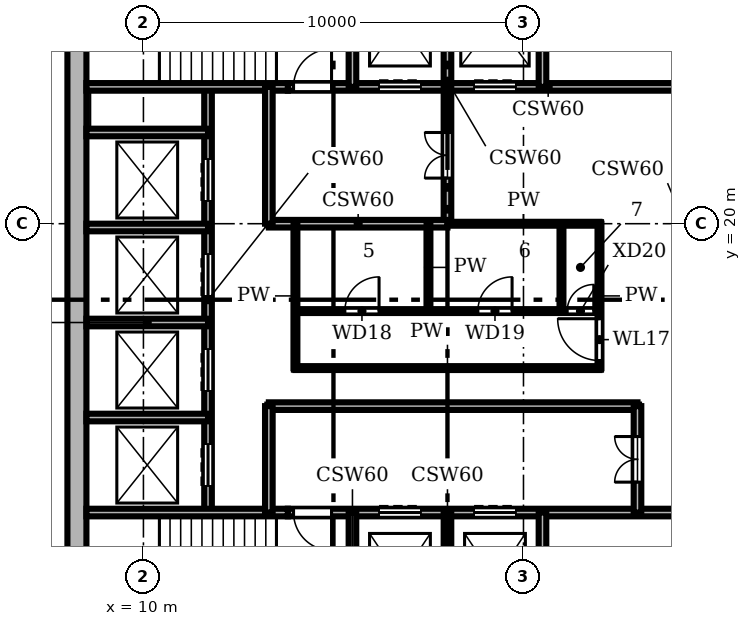
"""IFC4 building model, lengths in metres.
Left out: names, types, materials, properties, quantities, classifications, styles, units other than length and angle.
Written with IfcOpenShell. Run it as: python <this file> out.ifc"""

import sys

from ifc_helpers import new_model, si_unit, direction, frame, frame_2d, origin, place, context, subcontext, project, spatial, rectangle, extrude, element, fill, save


model = new_model("IFC4")
c1 = context("Model", 3, precision=1e-05, world=origin(), true_north=direction((0.0, 1.0)))
c2 = subcontext(c1, "Body", "Model", "MODEL_VIEW")
j1 = project(units=[si_unit("LENGTHUNIT", "METRE"), si_unit("PLANEANGLEUNIT", "RADIAN")], contexts=[c1])
p1 = place(None, origin())
s1 = spatial("IfcSite", under=j1, at=p1, CompositionType="ELEMENT")
p2 = place(p1, origin())
s2 = spatial("IfcBuilding", under=s1, at=p2, CompositionType="ELEMENT")
p3 = place(p2, frame((0.0, 0.0, 251.4)))
s3 = spatial("IfcBuildingStorey", under=s2, at=p3, CompositionType="ELEMENT", Elevation=251.4)
p4 = place(p3, frame((8.25, 27.5, 0.0), z_axis=(0.0, 0.0, 1.0), x_axis=(0.0, -1.0, 0.0)))
e1 = element("IfcWall", 1, at=p4, inside=s3, PredefinedType="SHEAR", context=c2, shape_type="SweptSolid", body=[
    extrude(rectangle(XDim=19.0, YDim=0.5, at=frame_2d((9.5, 0.0))), origin(), (0.0, 0.0, 1.0), 3.9),
])
p5 = place(p3, frame((8.5, 12.4, 0.0), z_axis=(0.0, 0.0, 1.0), x_axis=(1.0, 0.0, 0.0)))
e2 = element("IfcWall", 2, at=p5, inside=s3, PredefinedType="SHEAR", context=c2, shape_type="SweptSolid", body=[
    extrude(rectangle(XDim=5.3, YDim=0.2, at=frame_2d((2.65, 0.0))), origin(), (0.0, 0.0, 1.0), 3.58),
])
p6 = place(p3, frame((13.8, 12.4, 0.0), z_axis=(0.0, 0.0, 1.0), x_axis=(1.0, 0.0, 0.0)))
e3 = element("IfcWall", 3, at=p6, inside=s3, PredefinedType="SHEAR", context=c2, shape_type="SweptSolid", body=[
    extrude(rectangle(XDim=13.7, YDim=0.2, at=frame_2d((6.85, 0.0))), origin(), (0.0, 0.0, 1.0), 3.58),
])
p7 = place(p6, frame((2.4, 0.0, 0.0)))
e4 = element("IfcOpeningElement", 4, at=p7, cuts=e3, PredefinedType="OPENING", context=c2, shape_type="SweptSolid", body=[
    extrude(rectangle(XDim=1.1, YDim=2.1, at=frame_2d((0.55, 1.05))), frame((0.0, 0.11, 0.0), z_axis=(0.0, -1.0, 0.0), x_axis=(1.0, 0.0, 0.0)), (0.0, 0.0, 1.0), 0.22),
])
p8 = place(p6, frame((4.9, 0.0, 0.0)))
e5 = element("IfcOpeningElement", 5, at=p8, cuts=e3, PredefinedType="OPENING", context=c2, shape_type="SweptSolid", body=[
    extrude(rectangle(XDim=1.1, YDim=2.1, at=frame_2d((0.55, 1.05))), frame((0.0, 0.11, 0.0), z_axis=(0.0, -1.0, 0.0), x_axis=(1.0, 0.0, 0.0)), (0.0, 0.0, 1.0), 0.22),
])
p9 = place(p6, frame((0.15, 0.0, 0.0)))
e6 = element("IfcOpeningElement", 6, at=p9, cuts=e3, PredefinedType="OPENING", context=c2, shape_type="SweptSolid", body=[
    extrude(rectangle(XDim=1.0, YDim=2.1, at=frame_2d((0.5, 1.05))), frame((0.0, 0.11, 0.0), z_axis=(0.0, -1.0, 0.0), x_axis=(1.0, 0.0, 0.0)), (0.0, 0.0, 1.0), 0.22),
])
p10 = place(p3, frame((8.5, 14.9, 0.0), z_axis=(0.0, 0.0, 1.0), x_axis=(1.0, 0.0, 0.0)))
e7 = element("IfcWall", 7, at=p10, inside=s3, PredefinedType="SHEAR", context=c2, shape_type="SweptSolid", body=[
    extrude(rectangle(XDim=3.2, YDim=0.2, at=frame_2d((1.6, 0.0))), origin(), (0.0, 0.0, 1.0), 3.58),
])
p11 = place(p3, frame((13.3, 15.2, 0.0), z_axis=(0.0, 0.0, 1.0), x_axis=(1.0, 0.0, 0.0)))
e8 = element("IfcWall", 8, at=p11, inside=s3, PredefinedType="SHEAR", context=c2, shape_type="SweptSolid", body=[
    extrude(rectangle(XDim=9.7, YDim=0.2, at=frame_2d((4.85, 0.0))), origin(), (0.0, 0.0, 1.0), 3.58),
])
p12 = place(p3, frame((14.0, 16.2, 0.0), z_axis=(0.0, 0.0, 1.0), x_axis=(1.0, 0.0, 0.0)))
e9 = element("IfcWall", 9, at=p12, inside=s3, PredefinedType="PARTITIONING", context=c2, shape_type="SweptSolid", body=[
    extrude(rectangle(XDim=8.0, YDim=0.1, at=frame_2d((4.0, 0.0))), origin(), (0.0, 0.0, 1.0), 3.58),
])
p13 = place(p3, frame((8.5, 17.4, 0.0), z_axis=(0.0, 0.0, 1.0), x_axis=(1.0, 0.0, 0.0)))
e10 = element("IfcWall", 10, at=p13, inside=s3, PredefinedType="SHEAR", context=c2, shape_type="SweptSolid", body=[
    extrude(rectangle(XDim=3.2, YDim=0.2, at=frame_2d((1.6, 0.0))), origin(), (0.0, 0.0, 1.0), 3.58),
])
p14 = place(p3, frame((14.0, 17.7, 0.0), z_axis=(0.0, 0.0, 1.0), x_axis=(1.0, 0.0, 0.0)))
e11 = element("IfcWall", 11, at=p14, inside=s3, PredefinedType="PARTITIONING", context=c2, shape_type="SweptSolid", body=[
    extrude(rectangle(XDim=8.0, YDim=0.1, at=frame_2d((4.0, 0.0))), origin(), (0.0, 0.0, 1.0), 3.58),
])
p15 = place(p14, frame((1.3, 0.0, 0.0)))
e12 = element("IfcOpeningElement", 12, at=p15, cuts=e11, PredefinedType="OPENING", context=c2, shape_type="SweptSolid", body=[
    extrude(rectangle(XDim=0.9, YDim=2.1, at=frame_2d((0.45, 1.05))), frame((0.0, 0.06, 0.0), z_axis=(0.0, -1.0, 0.0), x_axis=(1.0, 0.0, 0.0)), (0.0, 0.0, 1.0), 0.12),
])
p16 = place(p14, frame((4.8, 0.0, 0.0)))
e13 = element("IfcOpeningElement", 13, at=p16, cuts=e11, PredefinedType="OPENING", context=c2, shape_type="SweptSolid", body=[
    extrude(rectangle(XDim=0.9, YDim=2.1, at=frame_2d((0.45, 1.05))), frame((0.0, 0.06, 0.0), z_axis=(0.0, -1.0, 0.0), x_axis=(1.0, 0.0, 0.0)), (0.0, 0.0, 1.0), 0.12),
])
p17 = place(p14, frame((7.15, 0.0, 0.0)))
e14 = element("IfcOpeningElement", 14, at=p17, cuts=e11, PredefinedType="OPENING", context=c2, shape_type="SweptSolid", body=[
    extrude(rectangle(XDim=0.7, YDim=2.1, at=frame_2d((0.35, 1.05))), frame((0.0, 0.06, 0.0), z_axis=(0.0, -1.0, 0.0), x_axis=(1.0, 0.0, 0.0)), (0.0, 0.0, 1.0), 0.12),
])
p18 = place(p3, frame((8.5, 19.9, 0.0), z_axis=(0.0, 0.0, 1.0), x_axis=(1.0, 0.0, 0.0)))
e15 = element("IfcWall", 15, at=p18, inside=s3, PredefinedType="SHEAR", context=c2, shape_type="SweptSolid", body=[
    extrude(rectangle(XDim=3.2, YDim=0.2, at=frame_2d((1.6, 0.0))), origin(), (0.0, 0.0, 1.0), 3.58),
])
p19 = place(p3, frame((18.0, 20.0, 0.0), z_axis=(0.0, 0.0, 1.0), x_axis=(1.0, 0.0, 0.0)))
e16 = element("IfcWall", 16, at=p19, inside=s3, PredefinedType="PARTITIONING", context=c2, shape_type="SweptSolid", body=[
    extrude(rectangle(XDim=4.0, YDim=0.1, at=frame_2d((2.0, 0.0))), origin(), (0.0, 0.0, 1.0), 3.58),
])
p20 = place(p3, frame((13.3, 20.0, 0.0), z_axis=(0.0, 0.0, 1.0), x_axis=(1.0, 0.0, 0.0)))
e17 = element("IfcWall", 17, at=p20, inside=s3, PredefinedType="SHEAR", context=c2, shape_type="SweptSolid", body=[
    extrude(rectangle(XDim=4.7, YDim=0.2, at=frame_2d((2.35, 0.0))), origin(), (0.0, 0.0, 1.0), 3.58),
])
p21 = place(p3, frame((8.5, 22.4, 0.0), z_axis=(0.0, 0.0, 1.0), x_axis=(1.0, 0.0, 0.0)))
e18 = element("IfcWall", 18, at=p21, inside=s3, PredefinedType="SHEAR", context=c2, shape_type="SweptSolid", body=[
    extrude(rectangle(XDim=3.2, YDim=0.2, at=frame_2d((1.6, 0.0))), origin(), (0.0, 0.0, 1.0), 3.58),
])
p22 = place(p3, frame((8.5, 23.6, 0.0), z_axis=(0.0, 0.0, 1.0), x_axis=(1.0, 0.0, 0.0)))
e19 = element("IfcWall", 19, at=p22, inside=s3, PredefinedType="SHEAR", context=c2, shape_type="SweptSolid", body=[
    extrude(rectangle(XDim=5.3, YDim=0.2, at=frame_2d((2.65, 0.0))), origin(), (0.0, 0.0, 1.0), 3.58),
])
p23 = place(p3, frame((13.8, 23.6, 0.0), z_axis=(0.0, 0.0, 1.0), x_axis=(1.0, 0.0, 0.0)))
e20 = element("IfcWall", 20, at=p23, inside=s3, PredefinedType="SHEAR", context=c2, shape_type="SweptSolid", body=[
    extrude(rectangle(XDim=13.7, YDim=0.2, at=frame_2d((6.85, 0.0))), origin(), (0.0, 0.0, 1.0), 3.58),
])
p24 = place(p23, frame((2.4, 0.0, 0.0)))
e21 = element("IfcOpeningElement", 21, at=p24, cuts=e20, PredefinedType="OPENING", context=c2, shape_type="SweptSolid", body=[
    extrude(rectangle(XDim=1.1, YDim=2.1, at=frame_2d((0.55, 1.05))), frame((0.0, 0.11, 0.0), z_axis=(0.0, -1.0, 0.0), x_axis=(1.0, 0.0, 0.0)), (0.0, 0.0, 1.0), 0.22),
])
p25 = place(p23, frame((4.9, 0.0, 0.0)))
e22 = element("IfcOpeningElement", 22, at=p25, cuts=e20, PredefinedType="OPENING", context=c2, shape_type="SweptSolid", body=[
    extrude(rectangle(XDim=1.1, YDim=2.1, at=frame_2d((0.55, 1.05))), frame((0.0, 0.11, 0.0), z_axis=(0.0, -1.0, 0.0), x_axis=(1.0, 0.0, 0.0)), (0.0, 0.0, 1.0), 0.22),
])
p26 = place(p23, frame((0.15, 0.0, 0.0)))
e23 = element("IfcOpeningElement", 23, at=p26, cuts=e20, PredefinedType="OPENING", context=c2, shape_type="SweptSolid", body=[
    extrude(rectangle(XDim=1.0, YDim=2.1, at=frame_2d((0.5, 1.05))), frame((0.0, 0.11, 0.0), z_axis=(0.0, -1.0, 0.0), x_axis=(1.0, 0.0, 0.0)), (0.0, 0.0, 1.0), 0.22),
])
p27 = place(p3, frame((11.7, 12.4, 0.0), z_axis=(0.0, 0.0, 1.0), x_axis=(0.0, 1.0, 0.0)))
e24 = element("IfcWall", 24, at=p27, inside=s3, PredefinedType="SHEAR", context=c2, shape_type="SweptSolid", body=[
    extrude(rectangle(XDim=11.2, YDim=0.2, at=frame_2d((5.6, 0.0))), origin(), (0.0, 0.0, 1.0), 3.58),
])
p28 = place(p27, frame((0.7, 0.0, 0.0)))
e25 = element("IfcOpeningElement", 25, at=p28, cuts=e24, PredefinedType="OPENING", context=c2, shape_type="SweptSolid", body=[
    extrude(rectangle(XDim=1.1, YDim=2.1, at=frame_2d((0.55, 1.05))), frame((0.0, 0.11, 0.0), z_axis=(0.0, -1.0, 0.0), x_axis=(1.0, 0.0, 0.0)), (0.0, 0.0, 1.0), 0.22),
])
p29 = place(p27, frame((3.2, 0.0, 0.0)))
e26 = element("IfcOpeningElement", 26, at=p29, cuts=e24, PredefinedType="OPENING", context=c2, shape_type="SweptSolid", body=[
    extrude(rectangle(XDim=1.1, YDim=2.1, at=frame_2d((0.55, 1.05))), frame((0.0, 0.11, 0.0), z_axis=(0.0, -1.0, 0.0), x_axis=(1.0, 0.0, 0.0)), (0.0, 0.0, 1.0), 0.22),
])
p30 = place(p27, frame((5.7, 0.0, 0.0)))
e27 = element("IfcOpeningElement", 27, at=p30, cuts=e24, PredefinedType="OPENING", context=c2, shape_type="SweptSolid", body=[
    extrude(rectangle(XDim=1.1, YDim=2.1, at=frame_2d((0.55, 1.05))), frame((0.0, 0.11, 0.0), z_axis=(0.0, -1.0, 0.0), x_axis=(1.0, 0.0, 0.0)), (0.0, 0.0, 1.0), 0.22),
])
p31 = place(p27, frame((8.2, 0.0, 0.0)))
e28 = element("IfcOpeningElement", 28, at=p31, cuts=e24, PredefinedType="OPENING", context=c2, shape_type="SweptSolid", body=[
    extrude(rectangle(XDim=1.1, YDim=2.1, at=frame_2d((0.55, 1.05))), frame((0.0, 0.11, 0.0), z_axis=(0.0, -1.0, 0.0), x_axis=(1.0, 0.0, 0.0)), (0.0, 0.0, 1.0), 0.22),
])
p32 = place(p3, frame((13.3, 12.4, 0.0), z_axis=(0.0, 0.0, 1.0), x_axis=(0.0, 1.0, 0.0)))
e29 = element("IfcWall", 29, at=p32, inside=s3, PredefinedType="SHEAR", context=c2, shape_type="SweptSolid", body=[
    extrude(rectangle(XDim=2.8, YDim=0.2, at=frame_2d((1.4, 0.0))), origin(), (0.0, 0.0, 1.0), 3.58),
])
p33 = place(p3, frame((13.3, 20.0, 0.0), z_axis=(0.0, 0.0, 1.0), x_axis=(0.0, 1.0, 0.0)))
e30 = element("IfcWall", 30, at=p33, inside=s3, PredefinedType="SHEAR", context=c2, shape_type="SweptSolid", body=[
    extrude(rectangle(XDim=3.6, YDim=0.2, at=frame_2d((1.8, 0.0))), origin(), (0.0, 0.0, 1.0), 3.58),
])
p34 = place(p3, frame((14.0, 16.2, 0.0), z_axis=(0.0, 0.0, 1.0), x_axis=(0.0, 1.0, 0.0)))
e31 = element("IfcWall", 31, at=p34, inside=s3, PredefinedType="PARTITIONING", context=c2, shape_type="SweptSolid", body=[
    extrude(rectangle(XDim=3.8, YDim=0.1, at=frame_2d((1.9, 0.0))), origin(), (0.0, 0.0, 1.0), 3.58),
])
for number, where, z_axis, x_axis in (
    (32, (15.5, 8.5, 0.0), (0.0, 0.0, 1.0), (0.0, 1.0, 0.0)),
    (33, (15.5, 23.6, 0.0), (0.0, 0.0, 1.0), (0.0, 1.0, 0.0)),
):
    element("IfcWall", number, at=place(p3, frame(where, z_axis=z_axis, x_axis=x_axis)), inside=s3, PredefinedType="SHEAR", context=c2, shape_type="SweptSolid", body=[
        extrude(rectangle(XDim=3.9, YDim=0.2, at=frame_2d((1.95, 0.0))), origin(), (0.0, 0.0, 1.0), 3.58),
    ])
p35 = place(p3, frame((17.5, 17.7, 0.0), z_axis=(0.0, 0.0, 1.0), x_axis=(0.0, 1.0, 0.0)))
e34 = element("IfcWall", 34, at=p35, inside=s3, PredefinedType="PARTITIONING", context=c2, shape_type="SweptSolid", body=[
    extrude(rectangle(XDim=2.3, YDim=0.1, at=frame_2d((1.15, 0.0))), origin(), (0.0, 0.0, 1.0), 3.58),
])
p36 = place(p3, frame((18.0, 8.5, 0.0), z_axis=(0.0, 0.0, 1.0), x_axis=(0.0, 1.0, 0.0)))
e35 = element("IfcWall", 35, at=p36, inside=s3, PredefinedType="SHEAR", context=c2, shape_type="SweptSolid", body=[
    extrude(rectangle(XDim=3.9, YDim=0.2, at=frame_2d((1.95, 0.0))), origin(), (0.0, 0.0, 1.0), 3.58),
])
p37 = place(p3, frame((18.0, 20.0, 0.0), z_axis=(0.0, 0.0, 1.0), x_axis=(0.0, 1.0, 0.0)))
e36 = element("IfcWall", 36, at=p37, inside=s3, PredefinedType="SHEAR", context=c2, shape_type="SweptSolid", body=[
    extrude(rectangle(XDim=7.5, YDim=0.2, at=frame_2d((3.75, 0.0))), origin(), (0.0, 0.0, 1.0), 3.58),
])
p38 = place(p37, frame((1.2, 0.0, 0.0)))
e37 = element("IfcOpeningElement", 37, at=p38, cuts=e36, PredefinedType="OPENING", context=c2, shape_type="SweptSolid", body=[
    extrude(rectangle(XDim=1.2, YDim=2.1, at=frame_2d((0.6, 1.05))), frame((0.0, 0.11, 0.0), z_axis=(0.0, -1.0, 0.0), x_axis=(1.0, 0.0, 0.0)), (0.0, 0.0, 1.0), 0.22),
])
for number, where, z_axis, x_axis in (
    (38, (20.5, 8.5, 0.0), (0.0, 0.0, 1.0), (0.0, 1.0, 0.0)),
    (39, (20.5, 23.6, 0.0), (0.0, 0.0, 1.0), (0.0, 1.0, 0.0)),
):
    element("IfcWall", number, at=place(p3, frame(where, z_axis=z_axis, x_axis=x_axis)), inside=s3, PredefinedType="SHEAR", context=c2, shape_type="SweptSolid", body=[
        extrude(rectangle(XDim=3.9, YDim=0.2, at=frame_2d((1.95, 0.0))), origin(), (0.0, 0.0, 1.0), 3.58),
    ])
p39 = place(p3, frame((21.0, 17.7, 0.0), z_axis=(0.0, 0.0, 1.0), x_axis=(0.0, 1.0, 0.0)))
e40 = element("IfcWall", 40, at=p39, inside=s3, PredefinedType="PARTITIONING", context=c2, shape_type="SweptSolid", body=[
    extrude(rectangle(XDim=2.3, YDim=0.1, at=frame_2d((1.15, 0.0))), origin(), (0.0, 0.0, 1.0), 3.58),
])
p40 = place(p3, frame((22.0, 16.2, 0.0), z_axis=(0.0, 0.0, 1.0), x_axis=(0.0, 1.0, 0.0)))
e41 = element("IfcWall", 41, at=p40, inside=s3, PredefinedType="PARTITIONING", context=c2, shape_type="SweptSolid", body=[
    extrude(rectangle(XDim=3.8, YDim=0.1, at=frame_2d((1.9, 0.0))), origin(), (0.0, 0.0, 1.0), 3.58),
])
p41 = place(p40, frame((0.2, 0.0, 0.0)))
e42 = element("IfcOpeningElement", 42, at=p41, cuts=e41, PredefinedType="OPENING", context=c2, shape_type="SweptSolid", body=[
    extrude(rectangle(XDim=1.1, YDim=2.1, at=frame_2d((0.55, 1.05))), frame((0.0, 0.06, 0.0), z_axis=(0.0, -1.0, 0.0), x_axis=(1.0, 0.0, 0.0)), (0.0, 0.0, 1.0), 0.12),
])
p42 = place(p3, frame((23.0, 12.4, 0.0), z_axis=(0.0, 0.0, 1.0), x_axis=(0.0, 1.0, 0.0)))
e43 = element("IfcWall", 43, at=p42, inside=s3, PredefinedType="SHEAR", context=c2, shape_type="SweptSolid", body=[
    extrude(rectangle(XDim=2.8, YDim=0.2, at=frame_2d((1.4, 0.0))), origin(), (0.0, 0.0, 1.0), 3.58),
])
p43 = place(p42, frame((0.8, 0.0, 0.0)))
e44 = element("IfcOpeningElement", 44, at=p43, cuts=e43, PredefinedType="OPENING", context=c2, shape_type="SweptSolid", body=[
    extrude(rectangle(XDim=1.2, YDim=2.1, at=frame_2d((0.6, 1.05))), frame((0.0, 0.11, 0.0), z_axis=(0.0, -1.0, 0.0), x_axis=(1.0, 0.0, 0.0)), (0.0, 0.0, 1.0), 0.22),
])
p44 = place(p28, origin())
e45 = element("IfcDoor", 45, at=p44, inside=s3, OperationType="DOUBLE_DOOR_SLIDING", PredefinedType="DOOR", context=c2, shape_type="SweptSolid", body=[
    extrude(rectangle(XDim=1.1, YDim=2.1, at=frame_2d((0.55, 1.05))), frame((0.0, 0.025, 0.0), z_axis=(0.0, -1.0, 0.0), x_axis=(1.0, 0.0, 0.0)), (0.0, 0.0, 1.0), 0.05),
])
fill(e25, e45)
p45 = place(p29, origin())
e46 = element("IfcDoor", 46, at=p45, inside=s3, OperationType="DOUBLE_DOOR_SLIDING", PredefinedType="DOOR", context=c2, shape_type="SweptSolid", body=[
    extrude(rectangle(XDim=1.1, YDim=2.1, at=frame_2d((0.55, 1.05))), frame((0.0, 0.025, 0.0), z_axis=(0.0, -1.0, 0.0), x_axis=(1.0, 0.0, 0.0)), (0.0, 0.0, 1.0), 0.05),
])
fill(e26, e46)
p46 = place(p30, origin())
e47 = element("IfcDoor", 47, at=p46, inside=s3, OperationType="DOUBLE_DOOR_SLIDING", PredefinedType="DOOR", context=c2, shape_type="SweptSolid", body=[
    extrude(rectangle(XDim=1.1, YDim=2.1, at=frame_2d((0.55, 1.05))), frame((0.0, 0.025, 0.0), z_axis=(0.0, -1.0, 0.0), x_axis=(1.0, 0.0, 0.0)), (0.0, 0.0, 1.0), 0.05),
])
fill(e27, e47)
p47 = place(p31, origin())
e48 = element("IfcDoor", 48, at=p47, inside=s3, OperationType="DOUBLE_DOOR_SLIDING", PredefinedType="DOOR", context=c2, shape_type="SweptSolid", body=[
    extrude(rectangle(XDim=1.1, YDim=2.1, at=frame_2d((0.55, 1.05))), frame((0.0, 0.025, 0.0), z_axis=(0.0, -1.0, 0.0), x_axis=(1.0, 0.0, 0.0)), (0.0, 0.0, 1.0), 0.05),
])
fill(e28, e48)
p48 = place(p7, origin())
e49 = element("IfcDoor", 49, at=p48, inside=s3, OperationType="DOUBLE_DOOR_SLIDING", PredefinedType="DOOR", context=c2, shape_type="SweptSolid", body=[
    extrude(rectangle(XDim=1.1, YDim=2.1, at=frame_2d((0.55, 1.05))), frame((0.0, 0.025, 0.0), z_axis=(0.0, -1.0, 0.0), x_axis=(1.0, 0.0, 0.0)), (0.0, 0.0, 1.0), 0.05),
])
fill(e4, e49)
p49 = place(p8, origin())
e50 = element("IfcDoor", 50, at=p49, inside=s3, OperationType="DOUBLE_DOOR_SLIDING", PredefinedType="DOOR", context=c2, shape_type="SweptSolid", body=[
    extrude(rectangle(XDim=1.1, YDim=2.1, at=frame_2d((0.55, 1.05))), frame((0.0, 0.025, 0.0), z_axis=(0.0, -1.0, 0.0), x_axis=(1.0, 0.0, 0.0)), (0.0, 0.0, 1.0), 0.05),
])
fill(e5, e50)
p50 = place(p24, origin())
e51 = element("IfcDoor", 51, at=p50, inside=s3, OperationType="DOUBLE_DOOR_SLIDING", PredefinedType="DOOR", context=c2, shape_type="SweptSolid", body=[
    extrude(rectangle(XDim=1.1, YDim=2.1, at=frame_2d((0.55, 1.05))), frame((0.0, 0.025, 0.0), z_axis=(0.0, -1.0, 0.0), x_axis=(1.0, 0.0, 0.0)), (0.0, 0.0, 1.0), 0.05),
])
fill(e21, e51)
p51 = place(p25, origin())
e52 = element("IfcDoor", 52, at=p51, inside=s3, OperationType="DOUBLE_DOOR_SLIDING", PredefinedType="DOOR", context=c2, shape_type="SweptSolid", body=[
    extrude(rectangle(XDim=1.1, YDim=2.1, at=frame_2d((0.55, 1.05))), frame((0.0, 0.025, 0.0), z_axis=(0.0, -1.0, 0.0), x_axis=(1.0, 0.0, 0.0)), (0.0, 0.0, 1.0), 0.05),
])
fill(e22, e52)
p52 = place(p9, frame((1.0, 0.0, 0.0), z_axis=(0.0, 0.0, 1.0), x_axis=(-1.0, 0.0, 0.0)))
e53 = element("IfcDoor", 53, at=p52, inside=s3, OperationType="SINGLE_SWING_LEFT", PredefinedType="DOOR", context=c2, shape_type="SweptSolid", body=[
    extrude(rectangle(XDim=1.0, YDim=2.1, at=frame_2d((0.5, 1.05))), frame((0.0, 0.025, 0.0), z_axis=(0.0, -1.0, 0.0), x_axis=(1.0, 0.0, 0.0)), (0.0, 0.0, 1.0), 0.05),
])
fill(e6, e53)
p53 = place(p26, origin())
e54 = element("IfcDoor", 54, at=p53, inside=s3, OperationType="SINGLE_SWING_RIGHT", PredefinedType="DOOR", context=c2, shape_type="SweptSolid", body=[
    extrude(rectangle(XDim=1.0, YDim=2.1, at=frame_2d((0.5, 1.05))), frame((0.0, 0.025, 0.0), z_axis=(0.0, -1.0, 0.0), x_axis=(1.0, 0.0, 0.0)), (0.0, 0.0, 1.0), 0.05),
])
fill(e23, e54)
p54 = place(p43, origin())
e55 = element("IfcDoor", 55, at=p54, inside=s3, OperationType="DOUBLE_DOOR_SINGLE_SWING", PredefinedType="DOOR", context=c2, shape_type="SweptSolid", body=[
    extrude(rectangle(XDim=1.2, YDim=2.1, at=frame_2d((0.6, 1.05))), frame((0.0, 0.025, 0.0), z_axis=(0.0, -1.0, 0.0), x_axis=(1.0, 0.0, 0.0)), (0.0, 0.0, 1.0), 0.05),
])
fill(e44, e55)
p55 = place(p38, origin())
e56 = element("IfcDoor", 56, at=p55, inside=s3, OperationType="DOUBLE_DOOR_SINGLE_SWING", PredefinedType="DOOR", context=c2, shape_type="SweptSolid", body=[
    extrude(rectangle(XDim=1.2, YDim=2.1, at=frame_2d((0.6, 1.05))), frame((0.0, 0.025, 0.0), z_axis=(0.0, -1.0, 0.0), x_axis=(1.0, 0.0, 0.0)), (0.0, 0.0, 1.0), 0.05),
])
fill(e37, e56)
p56 = place(p41, origin())
e57 = element("IfcDoor", 57, at=p56, inside=s3, OperationType="SINGLE_SWING_RIGHT", PredefinedType="DOOR", context=c2, shape_type="SweptSolid", body=[
    extrude(rectangle(XDim=1.1, YDim=2.1, at=frame_2d((0.55, 1.05))), frame((0.0, 0.025, 0.0), z_axis=(0.0, -1.0, 0.0), x_axis=(1.0, 0.0, 0.0)), (0.0, 0.0, 1.0), 0.05),
])
fill(e42, e57)
p57 = place(p15, origin())
e58 = element("IfcDoor", 58, at=p57, inside=s3, OperationType="SINGLE_SWING_RIGHT", PredefinedType="DOOR", context=c2, shape_type="SweptSolid", body=[
    extrude(rectangle(XDim=0.9, YDim=2.1, at=frame_2d((0.45, 1.05))), frame((0.0, 0.025, 0.0), z_axis=(0.0, -1.0, 0.0), x_axis=(1.0, 0.0, 0.0)), (0.0, 0.0, 1.0), 0.05),
])
fill(e12, e58)
p58 = place(p16, origin())
e59 = element("IfcDoor", 59, at=p58, inside=s3, OperationType="SINGLE_SWING_RIGHT", PredefinedType="DOOR", context=c2, shape_type="SweptSolid", body=[
    extrude(rectangle(XDim=0.9, YDim=2.1, at=frame_2d((0.45, 1.05))), frame((0.0, 0.025, 0.0), z_axis=(0.0, -1.0, 0.0), x_axis=(1.0, 0.0, 0.0)), (0.0, 0.0, 1.0), 0.05),
])
fill(e13, e59)
p59 = place(p17, origin())
e60 = element("IfcDoor", 60, at=p59, inside=s3, OperationType="SINGLE_SWING_RIGHT", PredefinedType="DOOR", context=c2, shape_type="SweptSolid", body=[
    extrude(rectangle(XDim=0.7, YDim=2.1, at=frame_2d((0.35, 1.05))), frame((0.0, 0.025, 0.0), z_axis=(0.0, -1.0, 0.0), x_axis=(1.0, 0.0, 0.0)), (0.0, 0.0, 1.0), 0.05),
])
fill(e14, e60)
save(model, sys.argv[1])
